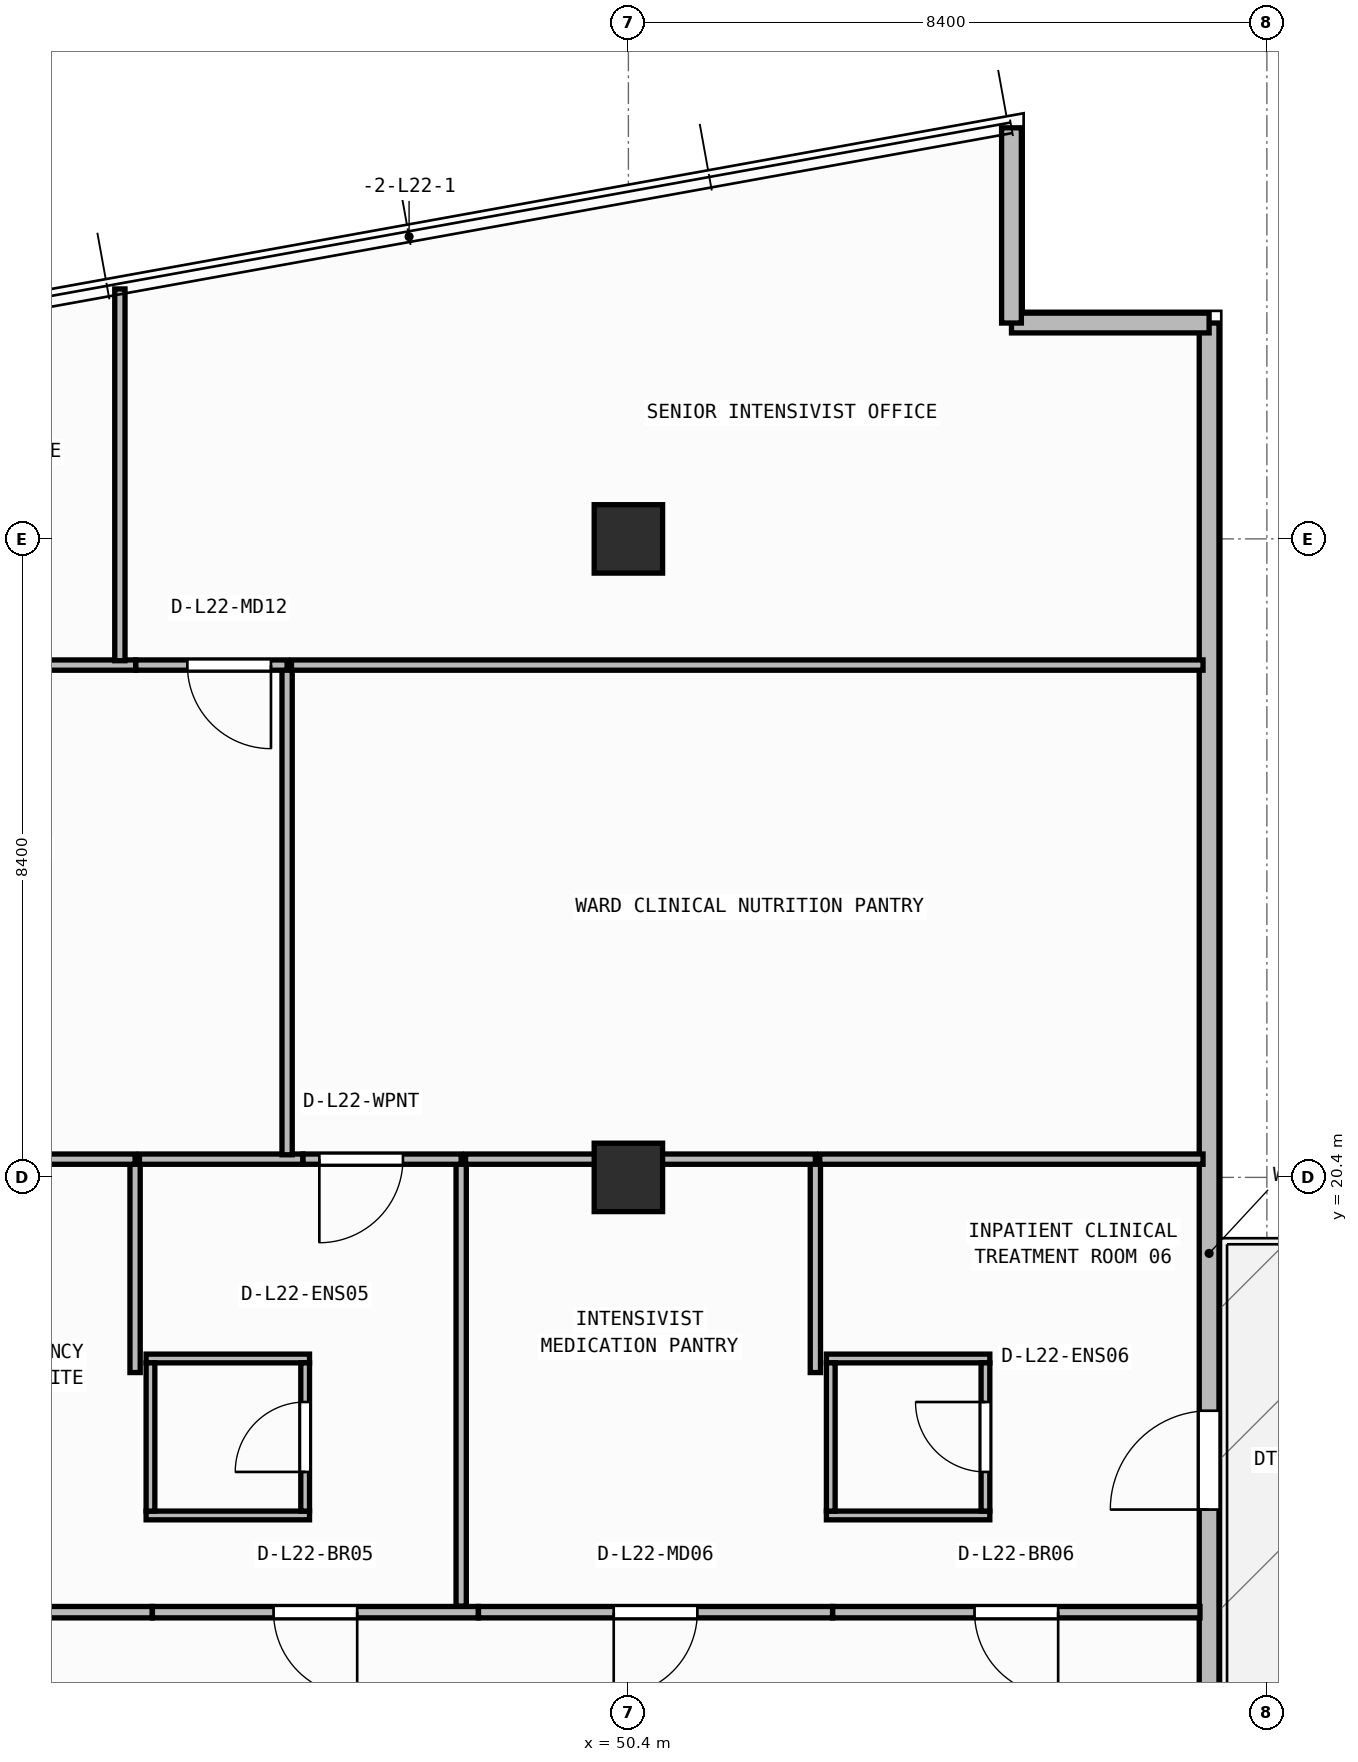
"""IFC4 building model, lengths in metres.
Left out: names, types, materials, properties, quantities, classifications, styles, units other than length and angle.
Written with IfcOpenShell. Run it as: python <this file> out.ifc"""

import sys

from ifc_helpers import new_model, si_unit, direction, frame, frame_2d, origin, origin_2d, place, context, subcontext, project, spatial, rectangle, extrude, element, fill, save


model = new_model("IFC4")
c1 = context("Model", 3, precision=1e-05, world=origin(), true_north=direction((0.0, 1.0)))
c2 = subcontext(c1, "Body", "Model", "MODEL_VIEW")
j1 = project(units=[si_unit("LENGTHUNIT", "METRE"), si_unit("PLANEANGLEUNIT", "RADIAN")], contexts=[c1])
p1 = place(None, origin())
s1 = spatial("IfcSite", under=j1, at=p1, CompositionType="ELEMENT")
p2 = place(p1, origin())
s2 = spatial("IfcBuilding", under=s1, at=p2, CompositionType="ELEMENT")
p3 = place(p2, frame((0.0, 0.0, 89.65)))
s3 = spatial("IfcBuildingStorey", under=s2, at=p3, CompositionType="ELEMENT", Elevation=89.65)
for number, where, z_axis, x_axis in (
    (1, (50.4, 20.4, 0.0), (0.0, 0.0, 1.0), (1.0, 0.0, 0.0)),
    (2, (50.4, 28.8, 0.0), (0.0, 0.0, 1.0), (1.0, 0.0, 0.0)),
):
    element("IfcColumn", number, at=place(p3, frame(where, z_axis=z_axis, x_axis=x_axis)), inside=s3, PredefinedType="COLUMN", context=c2, shape_type="SweptSolid", body=[
        extrude(rectangle(XDim=0.9, YDim=0.9, at=origin_2d()), origin(), (0.0, 0.0, 1.0), 3.95),
    ])
p4 = place(p3, frame((58.04, 7.16, 0.0), z_axis=(0.0, 0.0, 1.0), x_axis=(0.0, 1.0, 0.0)))
e3 = element("IfcWall", 3, at=p4, inside=s3, PredefinedType="STANDARD", context=c2, shape_type="SweptSolid", body=[
    extrude(rectangle(XDim=24.48, YDim=0.26, at=frame_2d((12.24, 0.0))), origin(), (0.0, 0.0, 1.0), 3.71),
])
p5 = place(p4, frame((8.87, 0.0, 0.0)))
e4 = element("IfcOpeningElement", 4, at=p5, cuts=e3, PredefinedType="OPENING", context=c2, shape_type="SweptSolid", body=[
    extrude(rectangle(XDim=1.3, YDim=2.15, at=frame_2d((0.65, 1.075))), frame((0.0, 0.14, 0.0), z_axis=(0.0, -1.0, 0.0), x_axis=(1.0, 0.0, 0.0)), (0.0, 0.0, 1.0), 0.28),
])
p6 = place(p3, frame((58.04, 31.64, 0.0), z_axis=(0.0, 0.0, 1.0), x_axis=(-1.0, 0.0, 0.0)))
e5 = element("IfcWall", 5, at=p6, inside=s3, PredefinedType="STANDARD", context=c2, shape_type="SweptSolid", body=[
    extrude(rectangle(XDim=2.6, YDim=0.26, at=frame_2d((1.3, 0.0))), origin(), (0.0, 0.0, 1.0), 3.71),
])
p7 = place(p3, frame((55.44, 31.64, 0.0), z_axis=(0.0, 0.0, 1.0), x_axis=(0.0, 1.0, 0.0)))
e6 = element("IfcWall", 6, at=p7, inside=s3, PredefinedType="STANDARD", context=c2, shape_type="SweptSolid", body=[
    extrude(rectangle(XDim=2.569, YDim=0.26, at=frame_2d((1.284, 0.0))), origin(), (0.0, 0.0, 1.0), 3.71),
])
p8 = place(p3, frame((44.055, 15.952, 0.0), z_axis=(0.0, 0.0, 1.0), x_axis=(1.0, 0.0, 0.0)))
e7 = element("IfcWall", 7, at=p8, inside=s3, PredefinedType="PARTITIONING", context=c2, shape_type="SweptSolid", body=[
    extrude(rectangle(XDim=2.15, YDim=0.115, at=frame_2d((1.075, 0.0))), origin(), (0.0, 0.0, 1.0), 3.329),
])
p9 = place(p3, frame((44.055, 18.018, 0.0), z_axis=(0.0, 0.0, 1.0), x_axis=(1.0, 0.0, 0.0)))
e8 = element("IfcWall", 8, at=p9, inside=s3, PredefinedType="PARTITIONING", context=c2, shape_type="SweptSolid", body=[
    extrude(rectangle(XDim=2.15, YDim=0.115, at=frame_2d((1.075, 0.0))), origin(), (0.0, 0.0, 1.0), 3.71),
])
p10 = place(p3, frame((44.113, 16.01, 0.0), z_axis=(0.0, 0.0, 1.0), x_axis=(0.0, 1.0, 0.0)))
e9 = element("IfcWall", 9, at=p10, inside=s3, PredefinedType="PARTITIONING", context=c2, shape_type="SweptSolid", body=[
    extrude(rectangle(XDim=1.95, YDim=0.115, at=frame_2d((0.975, 0.0))), origin(), (0.0, 0.0, 1.0), 3.71),
])
p11 = place(p3, frame((46.147, 16.01, 0.0), z_axis=(0.0, 0.0, 1.0), x_axis=(0.0, 1.0, 0.0)))
e10 = element("IfcWall", 10, at=p11, inside=s3, PredefinedType="PARTITIONING", context=c2, shape_type="SweptSolid", body=[
    extrude(rectangle(XDim=1.95, YDim=0.115, at=frame_2d((0.975, 0.0))), origin(), (0.0, 0.0, 1.0), 3.71),
])
p12 = place(p11, frame((0.515, 0.0, 0.0)))
e11 = element("IfcOpeningElement", 11, at=p12, cuts=e10, PredefinedType="OPENING", context=c2, shape_type="SweptSolid", body=[
    extrude(rectangle(XDim=0.92, YDim=2.1, at=frame_2d((0.46, 1.05))), frame((0.0, 0.067, 0.0), z_axis=(0.0, -1.0, 0.0), x_axis=(1.0, 0.0, 0.0)), (0.0, 0.0, 1.0), 0.135),
])
for number, where, z_axis, x_axis in (
    (12, (53.005, 15.952, 0.0), (0.0, 0.0, 1.0), (1.0, 0.0, 0.0)),
    (13, (53.005, 18.018, 0.0), (0.0, 0.0, 1.0), (1.0, 0.0, 0.0)),
):
    element("IfcWall", number, at=place(p3, frame(where, z_axis=z_axis, x_axis=x_axis)), inside=s3, PredefinedType="PARTITIONING", context=c2, shape_type="SweptSolid", body=[
        extrude(rectangle(XDim=2.15, YDim=0.115, at=frame_2d((1.075, 0.0))), origin(), (0.0, 0.0, 1.0), 3.71),
    ])
p13 = place(p3, frame((53.062, 16.01, 0.0), z_axis=(0.0, 0.0, 1.0), x_axis=(0.0, 1.0, 0.0)))
e14 = element("IfcWall", 14, at=p13, inside=s3, PredefinedType="PARTITIONING", context=c2, shape_type="SweptSolid", body=[
    extrude(rectangle(XDim=1.95, YDim=0.115, at=frame_2d((0.975, 0.0))), origin(), (0.0, 0.0, 1.0), 3.71),
])
p14 = place(p3, frame((55.097, 16.01, 0.0), z_axis=(0.0, 0.0, 1.0), x_axis=(0.0, 1.0, 0.0)))
e15 = element("IfcWall", 15, at=p14, inside=s3, PredefinedType="PARTITIONING", context=c2, shape_type="SweptSolid", body=[
    extrude(rectangle(XDim=1.95, YDim=0.115, at=frame_2d((0.975, 0.0))), origin(), (0.0, 0.0, 1.0), 3.71),
])
p15 = place(p14, frame((0.515, 0.0, 0.0)))
e16 = element("IfcOpeningElement", 16, at=p15, cuts=e15, PredefinedType="OPENING", context=c2, shape_type="SweptSolid", body=[
    extrude(rectangle(XDim=0.92, YDim=2.1, at=frame_2d((0.46, 1.05))), frame((0.0, 0.067, 0.0), z_axis=(0.0, -1.0, 0.0), x_axis=(1.0, 0.0, 0.0)), (0.0, 0.0, 1.0), 0.135),
])
p16 = place(p3, frame((44.136, 14.68, 0.0), z_axis=(0.0, 0.0, 1.0), x_axis=(-1.0, 0.0, 0.0)))
e17 = element("IfcWall", 17, at=p16, inside=s3, PredefinedType="PARTITIONING", context=c2, shape_type="SweptSolid", body=[
    extrude(rectangle(XDim=5.038, YDim=0.15, at=frame_2d((2.519, 0.0))), origin(), (0.0, 0.0, 1.0), 3.71),
])
p17 = place(p16, frame((1.969, 0.0, 0.0)))
e18 = element("IfcOpeningElement", 18, at=p17, cuts=e17, PredefinedType="OPENING", context=c2, shape_type="SweptSolid", body=[
    extrude(rectangle(XDim=1.1, YDim=2.1, at=frame_2d((0.55, 1.05))), frame((0.0, 0.085, 0.0), z_axis=(0.0, -1.0, 0.0), x_axis=(1.0, 0.0, 0.0)), (0.0, 0.0, 1.0), 0.17),
])
p18 = place(p3, frame((48.426, 14.68, 0.0), z_axis=(0.0, 0.0, 1.0), x_axis=(-1.0, 0.0, 0.0)))
e19 = element("IfcWall", 19, at=p18, inside=s3, PredefinedType="PARTITIONING", context=c2, shape_type="SweptSolid", body=[
    extrude(rectangle(XDim=4.288, YDim=0.15, at=frame_2d((2.144, 0.0))), origin(), (0.0, 0.0, 1.0), 3.71),
])
p19 = place(p18, frame((1.594, 0.0, 0.0)))
e20 = element("IfcOpeningElement", 20, at=p19, cuts=e19, PredefinedType="OPENING", context=c2, shape_type="SweptSolid", body=[
    extrude(rectangle(XDim=1.1, YDim=2.1, at=frame_2d((0.55, 1.05))), frame((0.0, 0.085, 0.0), z_axis=(0.0, -1.0, 0.0), x_axis=(1.0, 0.0, 0.0)), (0.0, 0.0, 1.0), 0.17),
])
p20 = place(p3, frame((53.086, 14.68, 0.0), z_axis=(0.0, 0.0, 1.0), x_axis=(-1.0, 0.0, 0.0)))
e21 = element("IfcWall", 21, at=p20, inside=s3, PredefinedType="PARTITIONING", context=c2, shape_type="SweptSolid", body=[
    extrude(rectangle(XDim=4.658, YDim=0.15, at=frame_2d((2.329, 0.0))), origin(), (0.0, 0.0, 1.0), 3.71),
])
p21 = place(p20, frame((1.779, 0.0, 0.0)))
e22 = element("IfcOpeningElement", 22, at=p21, cuts=e21, PredefinedType="OPENING", context=c2, shape_type="SweptSolid", body=[
    extrude(rectangle(XDim=1.1, YDim=2.1, at=frame_2d((0.55, 1.05))), frame((0.0, 0.085, 0.0), z_axis=(0.0, -1.0, 0.0), x_axis=(1.0, 0.0, 0.0)), (0.0, 0.0, 1.0), 0.17),
])
p22 = place(p3, frame((57.92, 14.68, 0.0), z_axis=(0.0, 0.0, 1.0), x_axis=(-1.0, 0.0, 0.0)))
e23 = element("IfcWall", 23, at=p22, inside=s3, PredefinedType="PARTITIONING", context=c2, shape_type="SweptSolid", body=[
    extrude(rectangle(XDim=4.832, YDim=0.15, at=frame_2d((2.416, 0.0))), origin(), (0.0, 0.0, 1.0), 3.71),
])
p23 = place(p22, frame((1.866, 0.0, 0.0)))
e24 = element("IfcOpeningElement", 24, at=p23, cuts=e23, PredefinedType="OPENING", context=c2, shape_type="SweptSolid", body=[
    extrude(rectangle(XDim=1.1, YDim=2.1, at=frame_2d((0.55, 1.05))), frame((0.0, 0.085, 0.0), z_axis=(0.0, -1.0, 0.0), x_axis=(1.0, 0.0, 0.0)), (0.0, 0.0, 1.0), 0.17),
])
p24 = place(p3, frame((43.91, 17.833, 0.0), z_axis=(0.0, 0.0, 1.0), x_axis=(0.0, 1.0, 0.0)))
e25 = element("IfcWall", 25, at=p24, inside=s3, PredefinedType="PARTITIONING", context=c2, shape_type="SweptSolid", body=[
    extrude(rectangle(XDim=2.807, YDim=0.135, at=frame_2d((1.404, 0.0))), origin(), (0.0, 0.0, 1.0), 3.71),
])
p25 = place(p3, frame((43.91, 20.64, 0.0), z_axis=(0.0, 0.0, 1.0), x_axis=(-1.0, 0.0, 0.0)))
e26 = element("IfcWall", 26, at=p25, inside=s3, PredefinedType="PARTITIONING", context=c2, shape_type="SweptSolid", body=[
    extrude(rectangle(XDim=4.982, YDim=0.135, at=frame_2d((2.491, 0.0))), origin(), (0.0, 0.0, 1.0), 3.073),
])
p26 = place(p25, frame((3.595, 0.0, 0.0)))
e27 = element("IfcOpeningElement", 27, at=p26, cuts=e26, PredefinedType="OPENING", context=c2, shape_type="SweptSolid", body=[
    extrude(rectangle(XDim=1.1, YDim=2.1, at=frame_2d((0.55, 1.05))), frame((0.0, 0.077, 0.0), z_axis=(0.0, -1.0, 0.0), x_axis=(1.0, 0.0, 0.0)), (0.0, 0.0, 1.0), 0.155),
])
p27 = place(p3, frame((48.2, 14.76, 0.0), z_axis=(0.0, 0.0, 1.0), x_axis=(0.0, 1.0, 0.0)))
e28 = element("IfcWall", 28, at=p27, inside=s3, PredefinedType="PARTITIONING", context=c2, shape_type="SweptSolid", body=[
    extrude(rectangle(XDim=5.88, YDim=0.135, at=frame_2d((2.94, 0.0))), origin(), (0.0, 0.0, 1.0), 3.71),
])
p28 = place(p3, frame((46.117, 20.64, 0.0), z_axis=(0.0, 0.0, 1.0), x_axis=(-1.0, 0.0, 0.0)))
e29 = element("IfcWall", 29, at=p28, inside=s3, PredefinedType="PARTITIONING", context=c2, shape_type="SweptSolid", body=[
    extrude(rectangle(XDim=2.15, YDim=0.135, at=frame_2d((1.075, 0.0))), origin(), (0.0, 0.0, 1.0), 3.073),
])
p29 = place(p3, frame((48.2, 20.64, 0.0), z_axis=(0.0, 0.0, 1.0), x_axis=(-1.0, 0.0, 0.0)))
e30 = element("IfcWall", 30, at=p29, inside=s3, PredefinedType="PARTITIONING", context=c2, shape_type="SweptSolid", body=[
    extrude(rectangle(XDim=2.081, YDim=0.135, at=frame_2d((1.04, 0.0))), origin(), (0.0, 0.0, 1.0), 3.073),
])
p30 = place(p29, frame((0.766, 0.0, 0.0)))
e31 = element("IfcOpeningElement", 31, at=p30, cuts=e30, PredefinedType="OPENING", context=c2, shape_type="SweptSolid", body=[
    extrude(rectangle(XDim=1.1, YDim=2.1, at=frame_2d((0.55, 1.05))), frame((0.0, 0.077, 0.0), z_axis=(0.0, -1.0, 0.0), x_axis=(1.0, 0.0, 0.0)), (0.0, 0.0, 1.0), 0.155),
])
p31 = place(p3, frame((52.86, 17.833, 0.0), z_axis=(0.0, 0.0, 1.0), x_axis=(0.0, 1.0, 0.0)))
e32 = element("IfcWall", 32, at=p31, inside=s3, PredefinedType="PARTITIONING", context=c2, shape_type="SweptSolid", body=[
    extrude(rectangle(XDim=2.807, YDim=0.135, at=frame_2d((1.404, 0.0))), origin(), (0.0, 0.0, 1.0), 3.71),
])
p32 = place(p3, frame((52.86, 20.64, 0.0), z_axis=(0.0, 0.0, 1.0), x_axis=(-1.0, 0.0, 0.0)))
e33 = element("IfcWall", 33, at=p32, inside=s3, PredefinedType="PARTITIONING", context=c2, shape_type="SweptSolid", body=[
    extrude(rectangle(XDim=4.603, YDim=0.135, at=frame_2d((2.301, 0.0))), origin(), (0.0, 0.0, 1.0), 3.073),
])
p33 = place(p3, frame((57.96, 20.64, 0.0), z_axis=(0.0, 0.0, 1.0), x_axis=(-1.0, 0.0, 0.0)))
e34 = element("IfcWall", 34, at=p33, inside=s3, PredefinedType="PARTITIONING", context=c2, shape_type="SweptSolid", body=[
    extrude(rectangle(XDim=5.042, YDim=0.135, at=frame_2d((2.521, 0.0))), origin(), (0.0, 0.0, 1.0), 3.71),
])
p34 = place(p3, frame((45.91, 20.698, 0.0), z_axis=(0.0, 0.0, 1.0), x_axis=(0.0, 1.0, 0.0)))
e35 = element("IfcWall", 35, at=p34, inside=s3, PredefinedType="PARTITIONING", context=c2, shape_type="SweptSolid", body=[
    extrude(rectangle(XDim=6.442, YDim=0.135, at=frame_2d((3.221, 0.0))), origin(), (0.0, 0.0, 1.0), 3.71),
])
p35 = place(p3, frame((43.917, 27.14, 0.0), z_axis=(0.0, 0.0, 1.0), x_axis=(-1.0, 0.0, 0.0)))
e36 = element("IfcWall", 36, at=p35, inside=s3, PredefinedType="PARTITIONING", context=c2, shape_type="SweptSolid", body=[
    extrude(rectangle(XDim=5.41, YDim=0.135, at=frame_2d((2.705, 0.0))), origin(), (0.0, 0.0, 1.0), 3.71),
])
p36 = place(p3, frame((45.91, 27.14, 0.0), z_axis=(0.0, 0.0, 1.0), x_axis=(-1.0, 0.0, 0.0)))
e37 = element("IfcWall", 37, at=p36, inside=s3, PredefinedType="PARTITIONING", context=c2, shape_type="SweptSolid", body=[
    extrude(rectangle(XDim=1.99, YDim=0.135, at=frame_2d((0.995, 0.0))), origin(), (0.0, 0.0, 1.0), 3.71),
])
p37 = place(p36, frame((0.212, 0.0, 0.0)))
e38 = element("IfcOpeningElement", 38, at=p37, cuts=e37, PredefinedType="OPENING", context=c2, shape_type="SweptSolid", body=[
    extrude(rectangle(XDim=1.1, YDim=2.1, at=frame_2d((0.55, 1.05))), frame((0.0, 0.077, 0.0), z_axis=(0.0, -1.0, 0.0), x_axis=(1.0, 0.0, 0.0)), (0.0, 0.0, 1.0), 0.155),
])
p38 = place(p3, frame((57.96, 27.14, 0.0), z_axis=(0.0, 0.0, 1.0), x_axis=(-1.0, 0.0, 0.0)))
e39 = element("IfcWall", 39, at=p38, inside=s3, PredefinedType="PARTITIONING", context=c2, shape_type="SweptSolid", body=[
    extrude(rectangle(XDim=11.992, YDim=0.135, at=frame_2d((5.996, 0.0))), origin(), (0.0, 0.0, 1.0), 3.71),
])
p39 = place(p3, frame((43.71, 27.198, 0.0), z_axis=(0.0, 0.0, 1.0), x_axis=(0.0, 1.0, 0.0)))
e40 = element("IfcWall", 40, at=p39, inside=s3, PredefinedType="PARTITIONING", context=c2, shape_type="SweptSolid", body=[
    extrude(rectangle(XDim=4.891, YDim=0.135, at=frame_2d((2.445, 0.0))), origin(), (0.0, 0.0, 1.0), 3.71),
])
p40 = place(p5, origin())
e41 = element("IfcDoor", 41, at=p40, inside=s3, OperationType="SINGLE_SWING_LEFT", PredefinedType="DOOR", context=c2, shape_type="SweptSolid", body=[
    extrude(rectangle(XDim=1.3, YDim=2.15, at=frame_2d((0.65, 1.075))), frame((0.0, 0.025, 0.0), z_axis=(0.0, -1.0, 0.0), x_axis=(1.0, 0.0, 0.0)), (0.0, 0.0, 1.0), 0.05),
])
fill(e4, e41)
p41 = place(p12, origin())
e42 = element("IfcDoor", 42, at=p41, inside=s3, OperationType="SINGLE_SWING_LEFT", PredefinedType="DOOR", context=c2, shape_type="SweptSolid", body=[
    extrude(rectangle(XDim=0.92, YDim=2.1, at=frame_2d((0.46, 1.05))), frame((0.0, 0.025, 0.0), z_axis=(0.0, -1.0, 0.0), x_axis=(1.0, 0.0, 0.0)), (0.0, 0.0, 1.0), 0.05),
])
fill(e11, e42)
p42 = place(p15, origin())
e43 = element("IfcDoor", 43, at=p42, inside=s3, OperationType="SINGLE_SWING_RIGHT", PredefinedType="DOOR", context=c2, shape_type="SweptSolid", body=[
    extrude(rectangle(XDim=0.92, YDim=2.1, at=frame_2d((0.46, 1.05))), frame((0.0, 0.025, 0.0), z_axis=(0.0, -1.0, 0.0), x_axis=(1.0, 0.0, 0.0)), (0.0, 0.0, 1.0), 0.05),
])
fill(e16, e43)
p43 = place(p19, origin())
e44 = element("IfcDoor", 44, at=p43, inside=s3, OperationType="SINGLE_SWING_LEFT", PredefinedType="DOOR", context=c2, shape_type="SweptSolid", body=[
    extrude(rectangle(XDim=1.1, YDim=2.1, at=frame_2d((0.55, 1.05))), frame((0.0, 0.025, 0.0), z_axis=(0.0, -1.0, 0.0), x_axis=(1.0, 0.0, 0.0)), (0.0, 0.0, 1.0), 0.05),
])
fill(e20, e44)
p44 = place(p21, origin())
e45 = element("IfcDoor", 45, at=p44, inside=s3, OperationType="SINGLE_SWING_RIGHT", PredefinedType="DOOR", context=c2, shape_type="SweptSolid", body=[
    extrude(rectangle(XDim=1.1, YDim=2.1, at=frame_2d((0.55, 1.05))), frame((0.0, 0.025, 0.0), z_axis=(0.0, -1.0, 0.0), x_axis=(1.0, 0.0, 0.0)), (0.0, 0.0, 1.0), 0.05),
])
fill(e22, e45)
p45 = place(p23, origin())
e46 = element("IfcDoor", 46, at=p45, inside=s3, OperationType="SINGLE_SWING_LEFT", PredefinedType="DOOR", context=c2, shape_type="SweptSolid", body=[
    extrude(rectangle(XDim=1.1, YDim=2.1, at=frame_2d((0.55, 1.05))), frame((0.0, 0.025, 0.0), z_axis=(0.0, -1.0, 0.0), x_axis=(1.0, 0.0, 0.0)), (0.0, 0.0, 1.0), 0.05),
])
fill(e24, e46)
p46 = place(p30, origin())
e47 = element("IfcDoor", 47, at=p46, inside=s3, OperationType="SINGLE_SWING_RIGHT", PredefinedType="DOOR", context=c2, shape_type="SweptSolid", body=[
    extrude(rectangle(XDim=1.1, YDim=2.1, at=frame_2d((0.55, 1.05))), frame((0.0, 0.025, 0.0), z_axis=(0.0, -1.0, 0.0), x_axis=(1.0, 0.0, 0.0)), (0.0, 0.0, 1.0), 0.05),
])
fill(e31, e47)
p47 = place(p37, origin())
e48 = element("IfcDoor", 48, at=p47, inside=s3, OperationType="SINGLE_SWING_LEFT", PredefinedType="DOOR", context=c2, shape_type="SweptSolid", body=[
    extrude(rectangle(XDim=1.1, YDim=2.1, at=frame_2d((0.55, 1.05))), frame((0.0, 0.025, 0.0), z_axis=(0.0, -1.0, 0.0), x_axis=(1.0, 0.0, 0.0)), (0.0, 0.0, 1.0), 0.05),
])
fill(e38, e48)
save(model, sys.argv[1])
